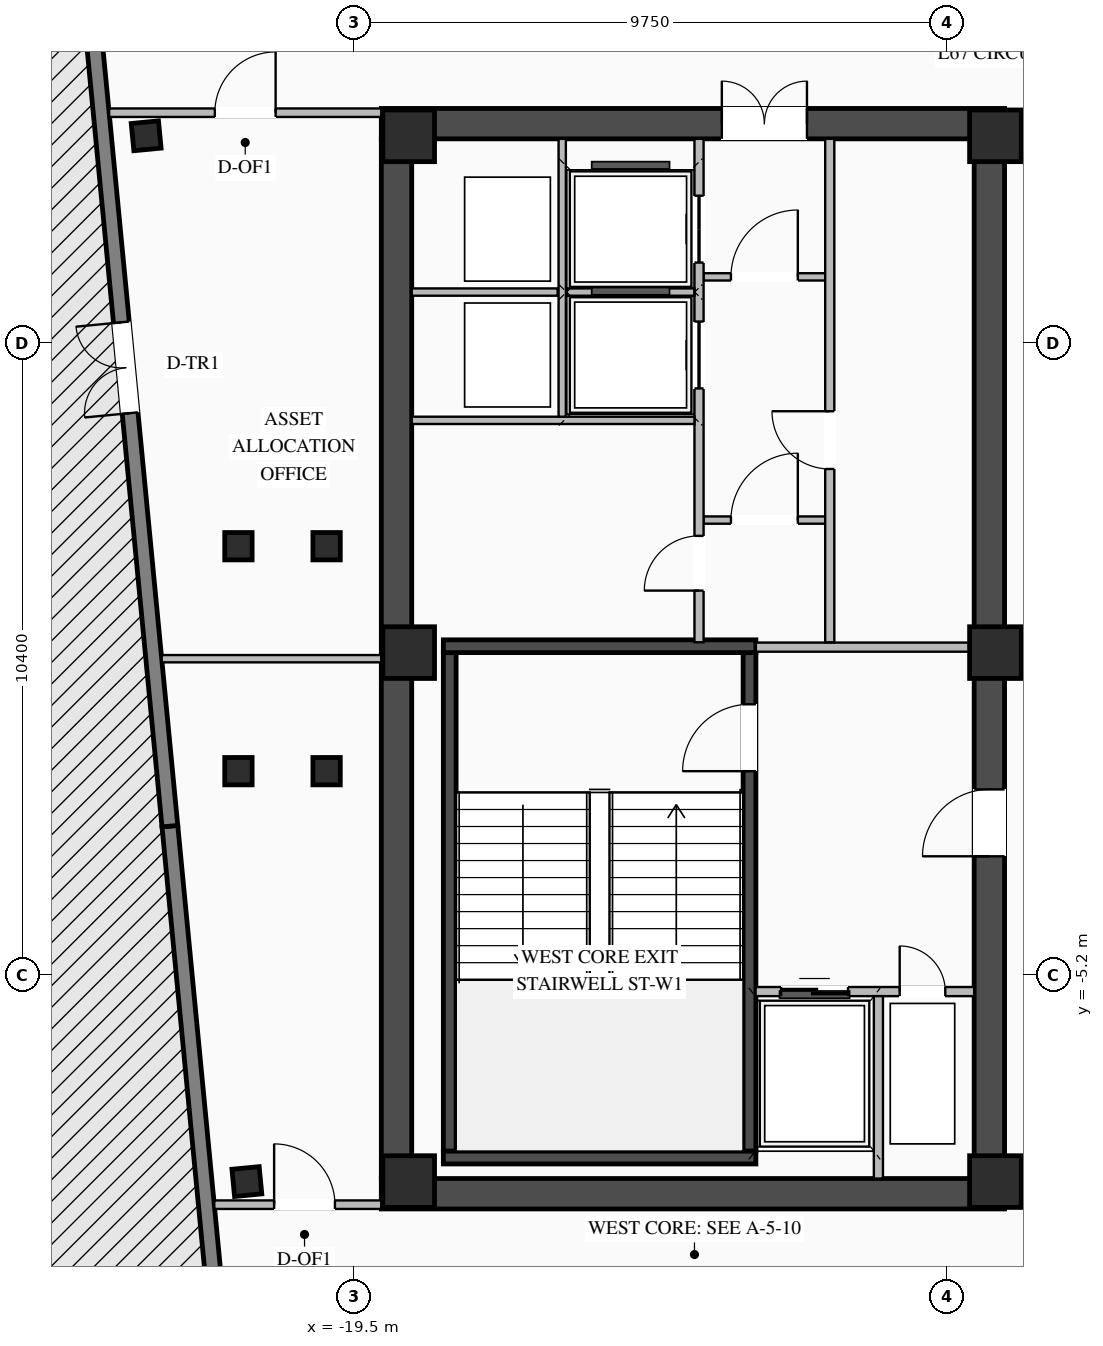
"""IFC4 building model, lengths in metres.
Left out: names, types, materials, properties, quantities, classifications, styles, units other than length and angle.
Written with IfcOpenShell. Run it as: python <this file> out.ifc"""

import sys

from ifc_helpers import new_model, si_unit, direction, frame, frame_2d, origin, origin_2d, place, context, subcontext, project, spatial, rectangle, i_section, extrude, element, fill, save


model = new_model("IFC4")
c1 = context("Model", 3, precision=1e-05, world=origin(), true_north=direction((0.0, 1.0)))
c2 = subcontext(c1, "Body", "Model", "MODEL_VIEW")
j1 = project(units=[si_unit("LENGTHUNIT", "METRE"), si_unit("PLANEANGLEUNIT", "RADIAN")], contexts=[c1])
p1 = place(None, origin())
s1 = spatial("IfcSite", under=j1, at=p1, CompositionType="ELEMENT")
p2 = place(p1, origin())
s2 = spatial("IfcBuilding", under=s1, at=p2, CompositionType="ELEMENT")
p3 = place(p2, frame((0.0, 0.0, 247.5)))
s3 = spatial("IfcBuildingStorey", under=s2, at=p3, CompositionType="ELEMENT", Elevation=247.5)
p4 = place(p3, frame((-19.05, -8.8, 0.0), z_axis=(0.0, 0.0, 1.0), x_axis=(1.0, 0.0, 0.0)))
e1 = element("IfcWall", 1, at=p4, inside=s3, PredefinedType="SHEAR", context=c2, shape_type="SweptSolid", body=[
    extrude(rectangle(XDim=10.25, YDim=0.5, at=frame_2d((5.125, 0.0))), origin(), (0.0, 0.0, 1.0), 4.02),
])
p5 = place(p3, frame((-19.05, 8.8, 0.0), z_axis=(0.0, 0.0, 1.0), x_axis=(1.0, 0.0, 0.0)))
e2 = element("IfcWall", 2, at=p5, inside=s3, PredefinedType="SHEAR", context=c2, shape_type="SweptSolid", body=[
    extrude(rectangle(XDim=10.25, YDim=0.5, at=frame_2d((5.125, 0.0))), origin(), (0.0, 0.0, 1.0), 4.02),
])
p6 = place(p5, frame((5.6, 0.0, 0.0)))
e3 = element("IfcOpeningElement", 3, at=p6, cuts=e2, PredefinedType="OPENING", context=c2, shape_type="SweptSolid", body=[
    extrude(rectangle(XDim=1.4, YDim=2.05, at=frame_2d((0.7, 1.025))), frame((0.0, 0.26, 0.0), z_axis=(0.0, -1.0, 0.0), x_axis=(1.0, 0.0, 0.0)), (0.0, 0.0, 1.0), 0.52),
])
p7 = place(p3, frame((-18.8, -8.55, 0.0), z_axis=(0.0, 0.0, 1.0), x_axis=(0.0, 1.0, 0.0)))
e4 = element("IfcWall", 4, at=p7, inside=s3, PredefinedType="SHEAR", context=c2, shape_type="SweptSolid", body=[
    extrude(rectangle(XDim=17.1, YDim=0.5, at=frame_2d((8.55, 0.0))), origin(), (0.0, 0.0, 1.0), 4.02),
])
p8 = place(p3, frame((-9.05, -8.55, 0.0), z_axis=(0.0, 0.0, 1.0), x_axis=(0.0, 1.0, 0.0)))
e5 = element("IfcWall", 5, at=p8, inside=s3, PredefinedType="SHEAR", context=c2, shape_type="SweptSolid", body=[
    extrude(rectangle(XDim=17.1, YDim=0.5, at=frame_2d((8.55, 0.0))), origin(), (0.0, 0.0, 1.0), 4.02),
])
p9 = place(p8, frame((5.3, 0.0, 0.0)))
e6 = element("IfcOpeningElement", 6, at=p9, cuts=e5, PredefinedType="OPENING", context=c2, shape_type="SweptSolid", body=[
    extrude(rectangle(XDim=1.1, YDim=2.08, at=frame_2d((0.55, 1.04))), frame((0.0, 0.26, 0.0), z_axis=(0.0, -1.0, 0.0), x_axis=(1.0, 0.0, 0.0)), (0.0, 0.0, 1.0), 0.52),
])
p10 = place(p3, frame((-12.995, -8.1, 0.0), z_axis=(0.0, 0.0, 1.0), x_axis=(0.0, 1.0, 0.0)))
e7 = element("IfcWall", 7, at=p10, inside=s3, PredefinedType="SHEAR", context=c2, shape_type="SweptSolid", body=[
    extrude(rectangle(XDim=8.2, YDim=0.21, at=frame_2d((4.1, 0.0))), origin(), (0.0, 0.0, 1.0), 4.02),
])
p11 = place(p10, frame((6.25, 0.0, 0.0)))
e8 = element("IfcOpeningElement", 8, at=p11, cuts=e7, PredefinedType="OPENING", context=c2, shape_type="SweptSolid", body=[
    extrude(rectangle(XDim=1.1, YDim=2.15, at=frame_2d((0.55, 1.075))), frame((0.0, 0.115, 0.0), z_axis=(0.0, -1.0, 0.0), x_axis=(1.0, 0.0, 0.0)), (0.0, 0.0, 1.0), 0.23),
])
p12 = place(p3, frame((-17.925, -8.1, 0.0), z_axis=(0.0, 0.0, 1.0), x_axis=(0.0, 1.0, 0.0)))
e9 = element("IfcWall", 9, at=p12, inside=s3, PredefinedType="SHEAR", context=c2, shape_type="SweptSolid", body=[
    extrude(rectangle(XDim=8.2, YDim=0.21, at=frame_2d((4.1, 0.0))), origin(), (0.0, 0.0, 1.0), 4.02),
])
for number, where, z_axis, x_axis in (
    (10, (-18.03, -8.205, 0.0), (0.0, 0.0, 1.0), (1.0, 0.0, 0.0)),
    (11, (-12.89, 0.205, 0.0), (0.0, 0.0, 1.0), (-1.0, 0.0, 0.0)),
):
    element("IfcWall", number, at=place(p3, frame(where, z_axis=z_axis, x_axis=x_axis)), inside=s3, PredefinedType="SHEAR", context=c2, shape_type="SweptSolid", body=[
        extrude(rectangle(XDim=5.14, YDim=0.21, at=frame_2d((2.57, 0.0))), origin(), (0.0, 0.0, 1.0), 4.02),
    ])
for number, where, z_axis, x_axis in (
    (12, (-8.95, -8.6, 0.0), (0.0, 0.0, 1.0), (1.0, 0.0, 0.0)),
    (13, (-8.95, 0.1, 0.0), (0.0, 0.0, 1.0), (1.0, 0.0, 0.0)),
    (14, (-8.95, 8.6, 0.0), (0.0, 0.0, 1.0), (1.0, 0.0, 0.0)),
    (15, (-18.6, -8.6, 0.0), (0.0, 0.0, 1.0), (1.0, 0.0, 0.0)),
    (16, (-18.6, 0.1, 0.0), (0.0, 0.0, 1.0), (1.0, 0.0, 0.0)),
    (17, (-18.6, 8.6, 0.0), (0.0, 0.0, 1.0), (1.0, 0.0, 0.0)),
):
    element("IfcColumn", number, at=place(p3, frame(where, z_axis=z_axis, x_axis=x_axis)), inside=s3, PredefinedType="COLUMN", context=c2, shape_type="SweptSolid", body=[
        extrude(rectangle(XDim=0.85, YDim=0.85, at=origin_2d()), origin(), (0.0, 0.0, 1.0), 4.2),
    ])
for number, where, z_axis, x_axis in (
    (18, (-21.4, -1.85, 0.0), (0.0, 0.0, 1.0), (1.0, 0.0, 0.0)),
    (19, (-21.4, 1.85, 0.0), (0.0, 0.0, 1.0), (1.0, 0.0, 0.0)),
    (20, (-19.95, -1.85, 0.0), (0.0, 0.0, 1.0), (1.0, 0.0, 0.0)),
    (21, (-19.95, 1.85, 0.0), (0.0, 0.0, 1.0), (1.0, 0.0, 0.0)),
):
    element("IfcColumn", number, at=place(p3, frame(where, z_axis=z_axis, x_axis=x_axis)), inside=s3, PredefinedType="COLUMN", context=c2, shape_type="SweptSolid", body=[
        extrude(i_section(OverallWidth=0.45, OverallDepth=0.45, WebThickness=0.022, FlangeThickness=0.032, at=origin_2d()), origin(), (0.0, 0.0, 1.0), 4.2),
    ])
p13 = place(p3, frame((-21.261, -8.6, -0.28), z_axis=(0.0, 0.0, 1.0), x_axis=(0.995396198367, 0.09584575252, 0.0)))
e22 = element("IfcColumn", 22, at=p13, inside=s3, PredefinedType="COLUMN", context=c2, shape_type="SweptSolid", body=[
    extrude(i_section(OverallWidth=0.45, OverallDepth=0.45, WebThickness=0.022, FlangeThickness=0.032, at=origin_2d()), origin(), (0.0, 0.0, 1.0), 4.48),
])
p14 = place(p3, frame((-22.917, 8.6, 0.0), z_axis=(0.0, 0.0, 1.0), x_axis=(0.995396198367, 0.09584575252, 0.0)))
e23 = element("IfcColumn", 23, at=p14, inside=s3, PredefinedType="COLUMN", context=c2, shape_type="SweptSolid", body=[
    extrude(i_section(OverallWidth=0.45, OverallDepth=0.45, WebThickness=0.022, FlangeThickness=0.032, at=origin_2d()), origin(), (0.0, 0.0, 1.0), 4.2),
])
p15 = place(p3, frame((-21.075, -17.834, 0.0), z_axis=(0.0, 0.0, 1.0), x_axis=(-0.095852427869, 0.995395555582, 0.0)))
e24 = element("IfcWall", 24, at=p15, inside=s3, PredefinedType="STANDARD", context=c2, shape_type="SweptSolid", body=[
    extrude(rectangle(XDim=15.15, YDim=0.26, at=frame_2d((7.575, 0.0))), origin(), (0.0, 0.0, 1.0), 2.795),
])
p16 = place(p15, frame((4.098, 0.0, 0.0)))
e25 = element("IfcOpeningElement", 25, at=p16, cuts=e24, PredefinedType="OPENING", context=c2, shape_type="SweptSolid", body=[
    extrude(rectangle(XDim=1.5, YDim=2.15, at=frame_2d((0.75, 1.075))), frame((0.0, 0.14, 0.0), z_axis=(0.0, -1.0, 0.0), x_axis=(1.0, 0.0, 0.0)), (0.0, 0.0, 1.0), 0.28),
])
p17 = place(p3, frame((-22.527, -2.754, 0.0), z_axis=(0.0, 0.0, 1.0), x_axis=(-0.095850890337, 0.995395703638, 0.0)))
e26 = element("IfcWall", 26, at=p17, inside=s3, PredefinedType="STANDARD", context=c2, shape_type="SweptSolid", body=[
    extrude(rectangle(XDim=15.15, YDim=0.26, at=frame_2d((7.575, 0.0))), origin(), (0.0, 0.0, 1.0), 4.0),
])
p18 = place(p17, frame((6.825, 0.0, 0.0)))
e27 = element("IfcOpeningElement", 27, at=p18, cuts=e26, PredefinedType="OPENING", context=c2, shape_type="SweptSolid", body=[
    extrude(rectangle(XDim=1.5, YDim=2.15, at=frame_2d((0.75, 1.075))), frame((0.0, 0.14, 0.0), z_axis=(0.0, -1.0, 0.0), x_axis=(1.0, 0.0, 0.0)), (0.0, 0.0, 1.0), 0.28),
])
p19 = place(p3, frame((-12.895, -5.475, 0.0), z_axis=(0.0, 0.0, 1.0), x_axis=(1.0, 0.0, 0.0)))
e28 = element("IfcWall", 28, at=p19, inside=s3, PredefinedType="STANDARD", context=c2, shape_type="SweptSolid", body=[
    extrude(rectangle(XDim=3.595, YDim=0.15, at=frame_2d((1.797, 0.0))), origin(), (0.0, 0.0, 1.0), 4.0),
])
p20 = place(p19, frame((0.42, 0.0, 0.0)))
e29 = element("IfcOpeningElement", 29, at=p20, cuts=e28, PredefinedType="OPENING", context=c2, shape_type="SweptSolid", body=[
    extrude(rectangle(XDim=1.1, YDim=2.15, at=frame_2d((0.55, 1.075))), frame((0.0, 0.085, 0.0), z_axis=(0.0, -1.0, 0.0), x_axis=(1.0, 0.0, 0.0)), (0.0, 0.0, 1.0), 0.17),
])
p21 = place(p19, frame((2.37, 0.0, 0.0)))
e30 = element("IfcOpeningElement", 30, at=p21, cuts=e28, PredefinedType="OPENING", context=c2, shape_type="SweptSolid", body=[
    extrude(rectangle(XDim=0.75, YDim=2.05, at=frame_2d((0.375, 1.025))), frame((0.0, 0.085, 0.0), z_axis=(0.0, -1.0, 0.0), x_axis=(1.0, 0.0, 0.0)), (0.0, 0.0, 1.0), 0.17),
])
p22 = place(p3, frame((-10.875, -8.55, 0.0), z_axis=(0.0, 0.0, 1.0), x_axis=(0.0, 1.0, 0.0)))
e31 = element("IfcWall", 31, at=p22, inside=s3, PredefinedType="STANDARD", context=c2, shape_type="SweptSolid", body=[
    extrude(rectangle(XDim=3.0, YDim=0.15, at=frame_2d((1.5, 0.0))), origin(), (0.0, 0.0, 1.0), 4.0),
])
p23 = place(p3, frame((-12.89, 0.19, 0.0), z_axis=(0.0, 0.0, 1.0), x_axis=(1.0, 0.0, 0.0)))
e32 = element("IfcWall", 32, at=p23, inside=s3, PredefinedType="STANDARD", context=c2, shape_type="SweptSolid", body=[
    extrude(rectangle(XDim=3.59, YDim=0.15, at=frame_2d((1.795, 0.0))), origin(), (0.0, 0.0, 1.0), 3.395),
])
p24 = place(p3, frame((-13.75, 2.28, 0.0), z_axis=(0.0, 0.0, 1.0), x_axis=(1.0, 0.0, 0.0)))
e33 = element("IfcWall", 33, at=p24, inside=s3, PredefinedType="STANDARD", context=c2, shape_type="SweptSolid", body=[
    extrude(rectangle(XDim=2.0, YDim=0.12, at=frame_2d((1.0, 0.0))), origin(), (0.0, 0.0, 1.0), 4.0),
])
p25 = place(p24, frame((0.45, 0.0, 0.0)))
e34 = element("IfcOpeningElement", 34, at=p25, cuts=e33, PredefinedType="OPENING", context=c2, shape_type="SweptSolid", body=[
    extrude(rectangle(XDim=1.1, YDim=2.1, at=frame_2d((0.55, 1.05))), frame((0.0, 0.07, 0.0), z_axis=(0.0, -1.0, 0.0), x_axis=(1.0, 0.0, 0.0)), (0.0, 0.0, 1.0), 0.14),
])
p26 = place(p3, frame((-13.75, 6.28, 0.0), z_axis=(0.0, 0.0, 1.0), x_axis=(1.0, 0.0, 0.0)))
e35 = element("IfcWall", 35, at=p26, inside=s3, PredefinedType="STANDARD", context=c2, shape_type="SweptSolid", body=[
    extrude(rectangle(XDim=2.0, YDim=0.12, at=frame_2d((1.0, 0.0))), origin(), (0.0, 0.0, 1.0), 4.0),
])
p27 = place(p26, frame((0.45, 0.0, 0.0)))
e36 = element("IfcOpeningElement", 36, at=p27, cuts=e35, PredefinedType="OPENING", context=c2, shape_type="SweptSolid", body=[
    extrude(rectangle(XDim=1.1, YDim=2.1, at=frame_2d((0.55, 1.05))), frame((0.0, 0.07, 0.0), z_axis=(0.0, -1.0, 0.0), x_axis=(1.0, 0.0, 0.0)), (0.0, 0.0, 1.0), 0.14),
])
p28 = place(p3, frame((-11.675, 0.27, 0.0), z_axis=(0.0, 0.0, 1.0), x_axis=(0.0, 1.0, 0.0)))
e37 = element("IfcWall", 37, at=p28, inside=s3, PredefinedType="STANDARD", context=c2, shape_type="SweptSolid", body=[
    extrude(rectangle(XDim=8.28, YDim=0.15, at=frame_2d((4.14, 0.0))), origin(), (0.0, 0.0, 1.0), 4.0),
])
p29 = place(p28, frame((2.85, 0.0, 0.0)))
e38 = element("IfcOpeningElement", 38, at=p29, cuts=e37, PredefinedType="OPENING", context=c2, shape_type="SweptSolid", body=[
    extrude(rectangle(XDim=0.95, YDim=2.05, at=frame_2d((0.475, 1.025))), frame((0.0, 0.085, 0.0), z_axis=(0.0, -1.0, 0.0), x_axis=(1.0, 0.0, 0.0)), (0.0, 0.0, 1.0), 0.17),
])
p30 = place(p3, frame((-13.825, 0.27, 0.0), z_axis=(0.0, 0.0, 1.0), x_axis=(0.0, 1.0, 0.0)))
e39 = element("IfcWall", 39, at=p30, inside=s3, PredefinedType="STANDARD", context=c2, shape_type="SweptSolid", body=[
    extrude(rectangle(XDim=8.28, YDim=0.15, at=frame_2d((4.14, 0.0))), origin(), (0.0, 0.0, 1.0), 4.0),
])
p31 = place(p30, frame((4.175, 0.0, 0.0)))
e40 = element("IfcOpeningElement", 40, at=p31, cuts=e39, PredefinedType="OPENING", context=c2, shape_type="SweptSolid", body=[
    extrude(rectangle(XDim=1.1, YDim=2.1, at=frame_2d((0.55, 1.05))), frame((0.0, 0.085, 0.0), z_axis=(0.0, -1.0, 0.0), x_axis=(1.0, 0.0, 0.0)), (0.0, 0.0, 1.0), 0.17),
])
p32 = place(p30, frame((6.245, 0.0, 0.0)))
e41 = element("IfcOpeningElement", 41, at=p32, cuts=e39, PredefinedType="OPENING", context=c2, shape_type="SweptSolid", body=[
    extrude(rectangle(XDim=1.1, YDim=2.1, at=frame_2d((0.55, 1.05))), frame((0.0, 0.085, 0.0), z_axis=(0.0, -1.0, 0.0), x_axis=(1.0, 0.0, 0.0)), (0.0, 0.0, 1.0), 0.17),
])
p33 = place(p30, frame((0.85, 0.0, 0.0)))
e42 = element("IfcOpeningElement", 42, at=p33, cuts=e39, PredefinedType="OPENING", context=c2, shape_type="SweptSolid", body=[
    extrude(rectangle(XDim=0.9, YDim=2.05, at=frame_2d((0.45, 1.025))), frame((0.0, 0.085, 0.0), z_axis=(0.0, -1.0, 0.0), x_axis=(1.0, 0.0, 0.0)), (0.0, 0.0, 1.0), 0.17),
])
p34 = place(p3, frame((-18.55, 3.92, 0.0), z_axis=(0.0, 0.0, 1.0), x_axis=(1.0, 0.0, 0.0)))
e43 = element("IfcWall", 43, at=p34, inside=s3, PredefinedType="STANDARD", context=c2, shape_type="SweptSolid", body=[
    extrude(rectangle(XDim=4.65, YDim=0.12, at=frame_2d((2.325, 0.0))), origin(), (0.0, 0.0, 1.0), 4.0),
])
p35 = place(p3, frame((-18.55, 6.03, 0.0), z_axis=(0.0, 0.0, 1.0), x_axis=(1.0, 0.0, 0.0)))
e44 = element("IfcWall", 44, at=p35, inside=s3, PredefinedType="STANDARD", context=c2, shape_type="SweptSolid", body=[
    extrude(rectangle(XDim=2.4, YDim=0.12, at=frame_2d((1.2, 0.0))), origin(), (0.0, 0.0, 1.0), 4.0),
])
p36 = place(p3, frame((-16.075, 3.98, 0.0), z_axis=(0.0, 0.0, 1.0), x_axis=(0.0, 1.0, 0.0)))
e45 = element("IfcWall", 45, at=p36, inside=s3, PredefinedType="STANDARD", context=c2, shape_type="SweptSolid", body=[
    extrude(rectangle(XDim=4.57, YDim=0.12, at=frame_2d((2.285, 0.0))), origin(), (0.0, 0.0, 1.0), 4.0),
])
p37 = place(p3, frame((-16.0, 6.03, 0.0), z_axis=(0.0, 0.0, 1.0), x_axis=(1.0, 0.0, 0.0)))
e46 = element("IfcWall", 46, at=p37, inside=s3, PredefinedType="STANDARD", context=c2, shape_type="SweptSolid", body=[
    extrude(rectangle(XDim=2.1, YDim=0.12, at=frame_2d((1.05, 0.0))), origin(), (0.0, 0.0, 1.0), 4.0),
])
p38 = place(p3, frame((-23.527, 8.98, 0.0), z_axis=(0.0, 0.0, 1.0), x_axis=(1.0, 0.0, 0.0)))
e47 = element("IfcWall", 47, at=p38, inside=s3, PredefinedType="STANDARD", context=c2, shape_type="SweptSolid", body=[
    extrude(rectangle(XDim=4.477, YDim=0.14, at=frame_2d((2.238, 0.0))), origin(), (0.0, 0.0, 1.0), 4.0),
])
p39 = place(p38, frame((1.738, 0.0, 0.0)))
e48 = element("IfcOpeningElement", 48, at=p39, cuts=e47, PredefinedType="OPENING", context=c2, shape_type="SweptSolid", body=[
    extrude(rectangle(XDim=1.0, YDim=2.08, at=frame_2d((0.5, 1.04))), frame((0.0, 0.08, 0.0), z_axis=(0.0, -1.0, 0.0), x_axis=(1.0, 0.0, 0.0)), (0.0, 0.0, 1.0), 0.16),
])
p40 = place(p3, frame((-21.797, -8.98, 0.0), z_axis=(0.0, 0.0, 1.0), x_axis=(1.0, 0.0, 0.0)))
e49 = element("IfcWall", 49, at=p40, inside=s3, PredefinedType="STANDARD", context=c2, shape_type="SweptSolid", body=[
    extrude(rectangle(XDim=2.747, YDim=0.14, at=frame_2d((1.374, 0.0))), origin(), (0.0, 0.0, 1.0), 4.0),
])
p41 = place(p40, frame((0.984, 0.0, 0.0)))
e50 = element("IfcOpeningElement", 50, at=p41, cuts=e49, PredefinedType="OPENING", context=c2, shape_type="SweptSolid", body=[
    extrude(rectangle(XDim=1.0, YDim=2.08, at=frame_2d((0.5, 1.04))), frame((0.0, 0.08, 0.0), z_axis=(0.0, -1.0, 0.0), x_axis=(1.0, 0.0, 0.0)), (0.0, 0.0, 1.0), 0.16),
])
p42 = place(p3, frame((-22.662, 0.0, 0.0), z_axis=(0.0, 0.0, 1.0), x_axis=(1.0, 0.0, 0.0)))
e51 = element("IfcWall", 51, at=p42, inside=s3, PredefinedType="STANDARD", context=c2, shape_type="SweptSolid", body=[
    extrude(rectangle(XDim=3.612, YDim=0.12, at=frame_2d((1.806, 0.0))), origin(), (0.0, 0.0, 1.0), 3.595),
])
p43 = place(p18, origin())
e52 = element("IfcDoor", 52, at=p43, inside=s3, OperationType="DOUBLE_DOOR_SINGLE_SWING", PredefinedType="DOOR", context=c2, shape_type="SweptSolid", body=[
    extrude(rectangle(XDim=1.5, YDim=2.15, at=frame_2d((0.75, 1.075))), frame((0.0, 0.025, 0.0), z_axis=(0.0, -1.0, 0.0), x_axis=(1.0, 0.0, 0.0)), (0.0, 0.0, 1.0), 0.05),
])
fill(e27, e52)
p44 = place(p11, origin())
e53 = element("IfcDoor", 53, at=p44, inside=s3, OperationType="SINGLE_SWING_LEFT", PredefinedType="DOOR", context=c2, shape_type="SweptSolid", body=[
    extrude(rectangle(XDim=1.1, YDim=2.15, at=frame_2d((0.55, 1.075))), frame((0.0, 0.025, 0.0), z_axis=(0.0, -1.0, 0.0), x_axis=(1.0, 0.0, 0.0)), (0.0, 0.0, 1.0), 0.05),
])
fill(e8, e53)
p45 = place(p20, origin())
e54 = element("IfcDoor", 54, at=p45, inside=s3, OperationType="DOUBLE_DOOR_SLIDING", PredefinedType="DOOR", context=c2, shape_type="SweptSolid", body=[
    extrude(rectangle(XDim=1.1, YDim=2.15, at=frame_2d((0.55, 1.075))), frame((0.0, 0.025, 0.0), z_axis=(0.0, -1.0, 0.0), x_axis=(1.0, 0.0, 0.0)), (0.0, 0.0, 1.0), 0.05),
])
fill(e29, e54)
p46 = place(p21, origin())
e55 = element("IfcDoor", 55, at=p46, inside=s3, OperationType="SINGLE_SWING_LEFT", PredefinedType="DOOR", context=c2, shape_type="SweptSolid", body=[
    extrude(rectangle(XDim=0.75, YDim=2.05, at=frame_2d((0.375, 1.025))), frame((0.0, 0.025, 0.0), z_axis=(0.0, -1.0, 0.0), x_axis=(1.0, 0.0, 0.0)), (0.0, 0.0, 1.0), 0.05),
])
fill(e30, e55)
p47 = place(p9, origin())
e56 = element("IfcDoor", 56, at=p47, inside=s3, OperationType="SINGLE_SWING_LEFT", PredefinedType="DOOR", context=c2, shape_type="SweptSolid", body=[
    extrude(rectangle(XDim=1.1, YDim=2.08, at=frame_2d((0.55, 1.04))), frame((0.0, 0.205, 0.0), z_axis=(0.0, -1.0, 0.0), x_axis=(1.0, 0.0, 0.0)), (0.0, 0.0, 1.0), 0.05),
])
fill(e6, e56)
p48 = place(p25, origin())
e57 = element("IfcDoor", 57, at=p48, inside=s3, OperationType="SINGLE_SWING_RIGHT", PredefinedType="DOOR", context=c2, shape_type="SweptSolid", body=[
    extrude(rectangle(XDim=1.1, YDim=2.1, at=frame_2d((0.55, 1.05))), frame((0.0, 0.025, 0.0), z_axis=(0.0, -1.0, 0.0), x_axis=(1.0, 0.0, 0.0)), (0.0, 0.0, 1.0), 0.05),
])
fill(e34, e57)
p49 = place(p27, origin())
e58 = element("IfcDoor", 58, at=p49, inside=s3, OperationType="SINGLE_SWING_RIGHT", PredefinedType="DOOR", context=c2, shape_type="SweptSolid", body=[
    extrude(rectangle(XDim=1.1, YDim=2.1, at=frame_2d((0.55, 1.05))), frame((0.0, 0.025, 0.0), z_axis=(0.0, -1.0, 0.0), x_axis=(1.0, 0.0, 0.0)), (0.0, 0.0, 1.0), 0.05),
])
fill(e36, e58)
p50 = place(p6, origin())
e59 = element("IfcDoor", 59, at=p50, inside=s3, OperationType="DOUBLE_DOOR_SINGLE_SWING", PredefinedType="DOOR", context=c2, shape_type="SweptSolid", body=[
    extrude(rectangle(XDim=1.4, YDim=2.05, at=frame_2d((0.7, 1.025))), frame((0.0, 0.195, 0.0), z_axis=(0.0, -1.0, 0.0), x_axis=(1.0, 0.0, 0.0)), (0.0, 0.0, 1.0), 0.05),
])
fill(e3, e59)
p51 = place(p29, origin())
e60 = element("IfcDoor", 60, at=p51, inside=s3, OperationType="SINGLE_SWING_RIGHT", PredefinedType="DOOR", context=c2, shape_type="SweptSolid", body=[
    extrude(rectangle(XDim=0.95, YDim=2.05, at=frame_2d((0.475, 1.025))), frame((0.0, 0.025, 0.0), z_axis=(0.0, -1.0, 0.0), x_axis=(1.0, 0.0, 0.0)), (0.0, 0.0, 1.0), 0.05),
])
fill(e38, e60)
p52 = place(p31, origin())
e61 = element("IfcDoor", 61, at=p52, inside=s3, OperationType="DOUBLE_DOOR_SLIDING", PredefinedType="DOOR", context=c2, shape_type="SweptSolid", body=[
    extrude(rectangle(XDim=1.1, YDim=2.1, at=frame_2d((0.55, 1.05))), frame((0.0, 0.025, 0.0), z_axis=(0.0, -1.0, 0.0), x_axis=(1.0, 0.0, 0.0)), (0.0, 0.0, 1.0), 0.05),
])
fill(e40, e61)
p53 = place(p32, origin())
e62 = element("IfcDoor", 62, at=p53, inside=s3, OperationType="DOUBLE_DOOR_SLIDING", PredefinedType="DOOR", context=c2, shape_type="SweptSolid", body=[
    extrude(rectangle(XDim=1.1, YDim=2.1, at=frame_2d((0.55, 1.05))), frame((0.0, 0.025, 0.0), z_axis=(0.0, -1.0, 0.0), x_axis=(1.0, 0.0, 0.0)), (0.0, 0.0, 1.0), 0.05),
])
fill(e41, e62)
p54 = place(p33, origin())
e63 = element("IfcDoor", 63, at=p54, inside=s3, OperationType="SINGLE_SWING_LEFT", PredefinedType="DOOR", context=c2, shape_type="SweptSolid", body=[
    extrude(rectangle(XDim=0.9, YDim=2.05, at=frame_2d((0.45, 1.025))), frame((0.0, 0.025, 0.0), z_axis=(0.0, -1.0, 0.0), x_axis=(1.0, 0.0, 0.0)), (0.0, 0.0, 1.0), 0.05),
])
fill(e42, e63)
p55 = place(p39, origin())
e64 = element("IfcDoor", 64, at=p55, inside=s3, OperationType="SINGLE_SWING_RIGHT", PredefinedType="DOOR", context=c2, shape_type="SweptSolid", body=[
    extrude(rectangle(XDim=1.0, YDim=2.08, at=frame_2d((0.5, 1.04))), frame((0.0, 0.025, 0.0), z_axis=(0.0, -1.0, 0.0), x_axis=(1.0, 0.0, 0.0)), (0.0, 0.0, 1.0), 0.05),
])
fill(e48, e64)
p56 = place(p41, origin())
e65 = element("IfcDoor", 65, at=p56, inside=s3, OperationType="SINGLE_SWING_LEFT", PredefinedType="DOOR", context=c2, shape_type="SweptSolid", body=[
    extrude(rectangle(XDim=1.0, YDim=2.08, at=frame_2d((0.5, 1.04))), frame((0.0, 0.025, 0.0), z_axis=(0.0, -1.0, 0.0), x_axis=(1.0, 0.0, 0.0)), (0.0, 0.0, 1.0), 0.05),
])
fill(e50, e65)
save(model, sys.argv[1])
